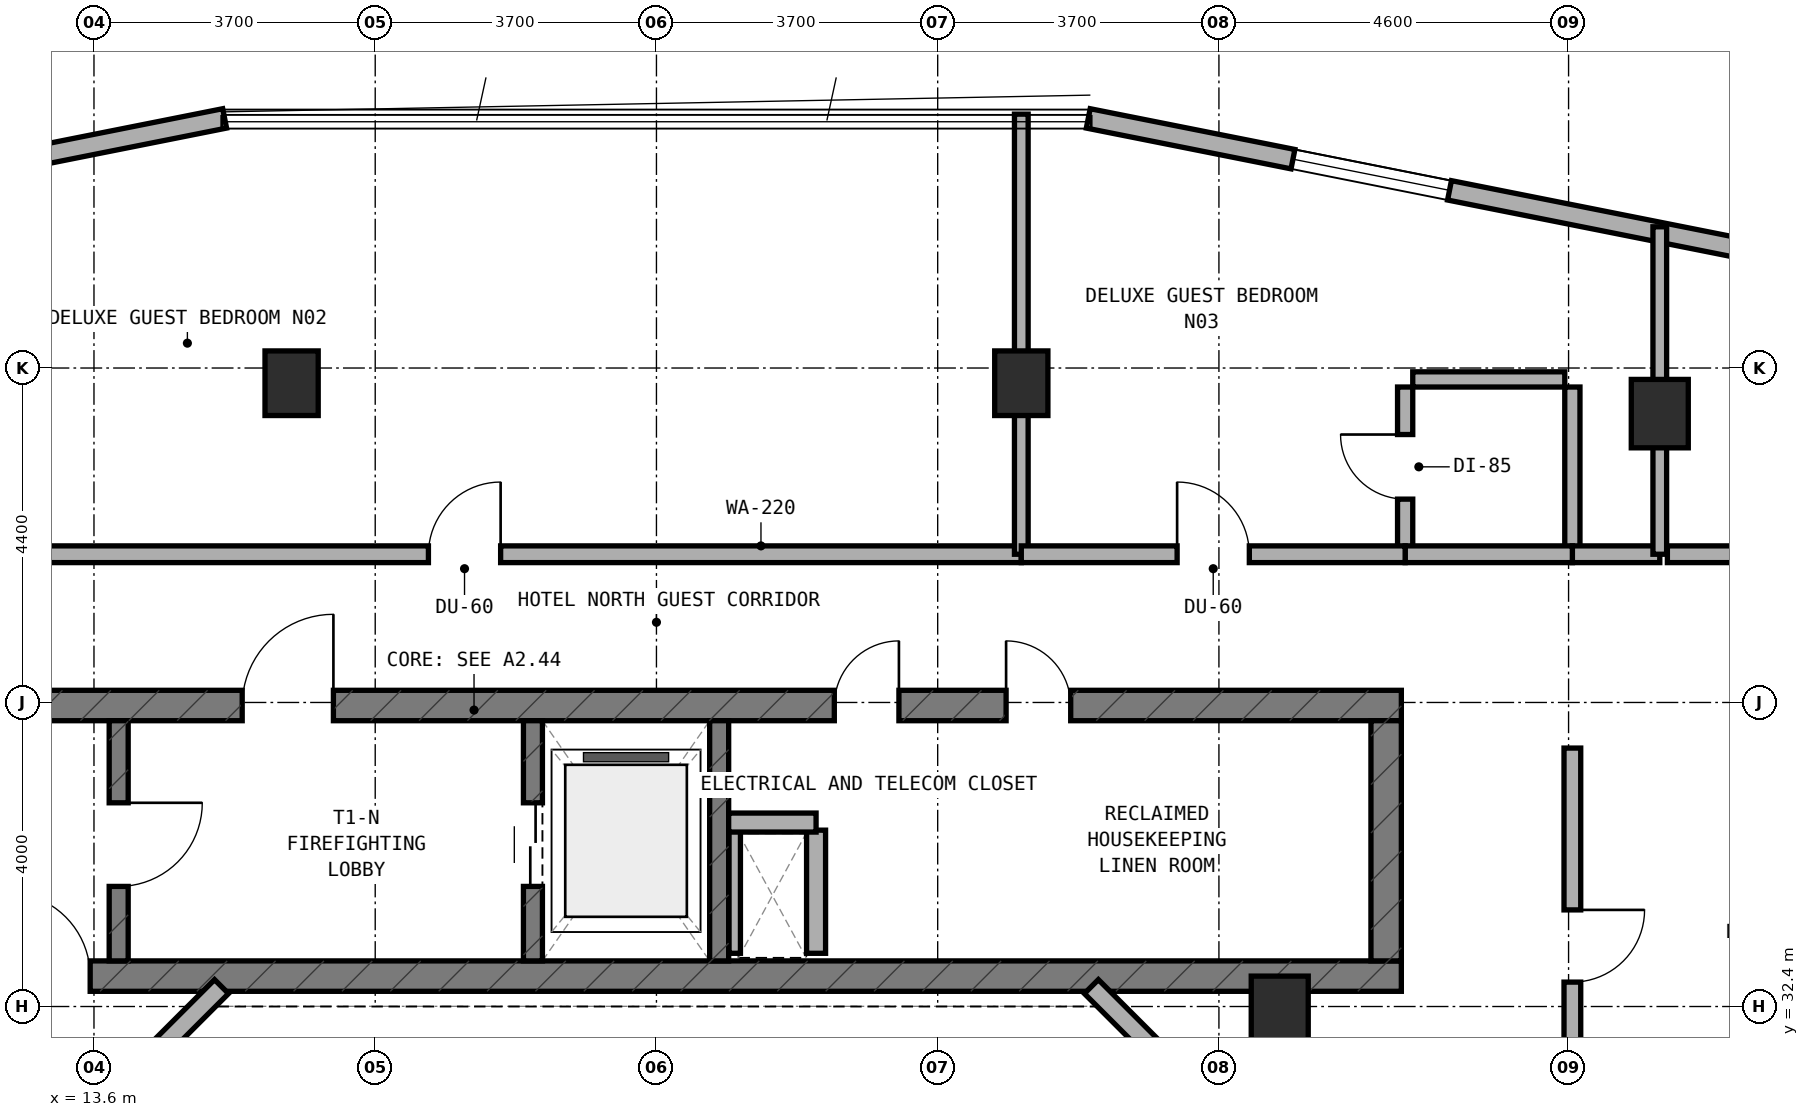
"""IFC4 building model, lengths in metres.
Left out: names, types, materials, properties, quantities, classifications, styles, units other than length and angle.
Written with IfcOpenShell. Run it as: python <this file> out.ifc"""

import sys

from ifc_helpers import new_model, si_unit, direction, frame, frame_2d, origin, origin_2d, place, context, subcontext, project, spatial, rectangle, extrude, element, fill, save


model = new_model("IFC4")
c1 = context("Model", 3, precision=1e-05, world=origin(), true_north=direction((0.0, 1.0)))
c2 = subcontext(c1, "Body", "Model", "MODEL_VIEW")
j1 = project(units=[si_unit("LENGTHUNIT", "METRE"), si_unit("PLANEANGLEUNIT", "RADIAN")], contexts=[c1])
p1 = place(None, origin())
s1 = spatial("IfcSite", under=j1, at=p1, CompositionType="ELEMENT")
p2 = place(p1, origin())
s2 = spatial("IfcBuilding", under=s1, at=p2, CompositionType="ELEMENT")
p3 = place(p2, frame((0.0, 0.0, 202.7)))
s3 = spatial("IfcBuildingStorey", under=s2, at=p3, CompositionType="ELEMENT", Elevation=202.7)
p4 = place(p3, frame((6.4, 32.8, 0.0), z_axis=(0.0, 0.0, 1.0), x_axis=(1.0, 0.0, 0.0)))
e1 = element("IfcWall", 1, at=p4, inside=s3, PredefinedType="SHEAR", context=c2, shape_type="SweptSolid", body=[
    extrude(rectangle(XDim=24.4, YDim=0.4, at=frame_2d((12.2, 0.0))), origin(), (0.0, 0.0, 1.0), 3.6),
])
p5 = place(p4, frame((6.05, 0.0, 0.0)))
e2 = element("IfcOpeningElement", 2, at=p5, cuts=e1, PredefinedType="OPENING", context=c2, shape_type="SweptSolid", body=[
    extrude(rectangle(XDim=1.1, YDim=2.15, at=frame_2d((0.55, 1.075))), frame((0.0, 0.21, 0.0), z_axis=(0.0, -1.0, 0.0), x_axis=(1.0, 0.0, 0.0)), (0.0, 0.0, 1.0), 0.42),
])
p6 = place(p3, frame((6.4, 36.36, 0.0), z_axis=(0.0, 0.0, 1.0), x_axis=(1.0, 0.0, 0.0)))
e3 = element("IfcWall", 3, at=p6, inside=s3, PredefinedType="SHEAR", context=c2, shape_type="SweptSolid", body=[
    extrude(rectangle(XDim=24.4, YDim=0.4, at=frame_2d((12.2, 0.0))), origin(), (0.0, 0.0, 1.0), 3.6),
])
p7 = place(p6, frame((9.15, 0.0, 0.0)))
e4 = element("IfcOpeningElement", 4, at=p7, cuts=e3, PredefinedType="OPENING", context=c2, shape_type="SweptSolid", body=[
    extrude(rectangle(XDim=1.2, YDim=2.15, at=frame_2d((0.6, 1.075))), frame((0.0, 0.21, 0.0), z_axis=(0.0, -1.0, 0.0), x_axis=(1.0, 0.0, 0.0)), (0.0, 0.0, 1.0), 0.42),
])
p8 = place(p6, frame((19.2, 0.0, 0.0)))
e5 = element("IfcOpeningElement", 5, at=p8, cuts=e3, PredefinedType="OPENING", context=c2, shape_type="SweptSolid", body=[
    extrude(rectangle(XDim=0.85, YDim=2.1, at=frame_2d((0.425, 1.05))), frame((0.0, 0.21, 0.0), z_axis=(0.0, -1.0, 0.0), x_axis=(1.0, 0.0, 0.0)), (0.0, 0.0, 1.0), 0.42),
])
p9 = place(p6, frame((16.94, 0.0, 0.0)))
e6 = element("IfcOpeningElement", 6, at=p9, cuts=e3, PredefinedType="OPENING", context=c2, shape_type="SweptSolid", body=[
    extrude(rectangle(XDim=0.85, YDim=2.1, at=frame_2d((0.425, 1.05))), frame((0.0, 0.21, 0.0), z_axis=(0.0, -1.0, 0.0), x_axis=(1.0, 0.0, 0.0)), (0.0, 0.0, 1.0), 0.42),
])
p10 = place(p3, frame((30.6, 33.0, 0.0), z_axis=(0.0, 0.0, 1.0), x_axis=(0.0, 1.0, 0.0)))
e7 = element("IfcWall", 7, at=p10, inside=s3, PredefinedType="SHEAR", context=c2, shape_type="SweptSolid", body=[
    extrude(rectangle(XDim=3.16, YDim=0.4, at=frame_2d((1.58, 0.0))), origin(), (0.0, 0.0, 1.0), 3.6),
])
p11 = place(p3, frame((13.925, 33.0, 0.0), z_axis=(0.0, 0.0, 1.0), x_axis=(0.0, 1.0, 0.0)))
e8 = element("IfcWall", 8, at=p11, inside=s3, PredefinedType="STANDARD", context=c2, shape_type="SweptSolid", body=[
    extrude(rectangle(XDim=3.16, YDim=0.25, at=frame_2d((1.58, 0.0))), origin(), (0.0, 0.0, 1.0), 3.32),
])
p12 = place(p11, frame((0.98, 0.0, 0.0)))
e9 = element("IfcOpeningElement", 9, at=p12, cuts=e8, PredefinedType="OPENING", context=c2, shape_type="SweptSolid", body=[
    extrude(rectangle(XDim=1.1, YDim=2.15, at=frame_2d((0.55, 1.075))), frame((0.0, 0.135, 0.0), z_axis=(0.0, -1.0, 0.0), x_axis=(1.0, 0.0, 0.0)), (0.0, 0.0, 1.0), 0.27),
])
p13 = place(p3, frame((19.375, 33.0, 0.0), z_axis=(0.0, 0.0, 1.0), x_axis=(0.0, 1.0, 0.0)))
e10 = element("IfcWall", 10, at=p13, inside=s3, PredefinedType="STANDARD", context=c2, shape_type="SweptSolid", body=[
    extrude(rectangle(XDim=3.16, YDim=0.25, at=frame_2d((1.58, 0.0))), origin(), (0.0, 0.0, 1.0), 3.32),
])
p14 = place(p13, frame((0.98, 0.0, 0.0)))
e11 = element("IfcOpeningElement", 11, at=p14, cuts=e10, PredefinedType="OPENING", context=c2, shape_type="SweptSolid", body=[
    extrude(rectangle(XDim=1.1, YDim=2.15, at=frame_2d((0.55, 1.075))), frame((0.0, 0.135, 0.0), z_axis=(0.0, -1.0, 0.0), x_axis=(1.0, 0.0, 0.0)), (0.0, 0.0, 1.0), 0.27),
])
p15 = place(p3, frame((21.825, 33.0, 0.0), z_axis=(0.0, 0.0, 1.0), x_axis=(0.0, 1.0, 0.0)))
e12 = element("IfcWall", 12, at=p15, inside=s3, PredefinedType="STANDARD", context=c2, shape_type="SweptSolid", body=[
    extrude(rectangle(XDim=3.16, YDim=0.25, at=frame_2d((1.58, 0.0))), origin(), (0.0, 0.0, 1.0), 3.32),
])
for number, where, z_axis, x_axis in (
    (13, (16.2, 40.6, 0.0), (0.0, 0.0, 1.0), (1.0, 0.0, 0.0)),
    (14, (25.8, 40.6, 0.0), (0.0, 0.0, 1.0), (1.0, 0.0, 0.0)),
):
    element("IfcColumn", number, at=place(p3, frame(where, z_axis=z_axis, x_axis=x_axis)), inside=s3, PredefinedType="COLUMN", context=c2, shape_type="SweptSolid", body=[
        extrude(rectangle(XDim=0.7, YDim=0.85, at=origin_2d()), origin(), (0.0, 0.0, 1.0), 3.6),
    ])
for number, where, z_axis, x_axis in (
    (15, (34.2, 40.2, 0.0), (0.0, 0.0, 1.0), (1.0, 0.0, 0.0)),
    (16, (29.2, 32.35, 0.0), (0.0, 0.0, 1.0), (1.0, 0.0, 0.0)),
):
    element("IfcColumn", number, at=place(p3, frame(where, z_axis=z_axis, x_axis=x_axis)), inside=s3, PredefinedType="COLUMN", context=c2, shape_type="SweptSolid", body=[
        extrude(rectangle(XDim=0.75, YDim=0.9, at=origin_2d()), origin(), (0.0, 0.0, 1.0), 3.6),
    ])
p16 = place(p3, frame((35.283, 42.371, 0.0), z_axis=(0.0, 0.0, 1.0), x_axis=(-0.980745199176, 0.195291715883, 0.0)))
e17 = element("IfcWall", 17, at=p16, inside=s3, PredefinedType="STANDARD", context=c2, shape_type="SweptSolid", body=[
    extrude(rectangle(XDim=8.771, YDim=0.26, at=frame_2d((4.385, 0.0))), origin(), (0.0, 0.0, 1.0), 3.32),
])
p17 = place(p16, frame((3.925, 0.0, 0.85)))
e18 = element("IfcOpeningElement", 18, at=p17, cuts=e17, PredefinedType="OPENING", context=c2, shape_type="SweptSolid", body=[
    extrude(rectangle(XDim=2.1, YDim=1.5, at=frame_2d((1.05, 0.75))), frame((0.0, 0.14, 0.0), z_axis=(0.0, -1.0, 0.0), x_axis=(1.0, 0.0, 0.0)), (0.0, 0.0, 1.0), 0.28),
])
p18 = place(p3, frame((15.319, 44.084, 0.0), z_axis=(0.0, 0.0, 1.0), x_axis=(-0.980745199176, -0.195291715883, 0.0)))
e19 = element("IfcWall", 19, at=p18, inside=s3, PredefinedType="STANDARD", context=c2, shape_type="SweptSolid", body=[
    extrude(rectangle(XDim=8.771, YDim=0.26, at=frame_2d((4.385, 0.0))), origin(), (0.0, 0.0, 1.0), 3.32),
])
p19 = place(p18, frame((2.746, 0.0, 0.85)))
e20 = element("IfcOpeningElement", 20, at=p19, cuts=e19, PredefinedType="OPENING", context=c2, shape_type="SweptSolid", body=[
    extrude(rectangle(XDim=2.1, YDim=1.5, at=frame_2d((1.05, 0.75))), frame((0.0, 0.14, 0.0), z_axis=(0.0, -1.0, 0.0), x_axis=(1.0, 0.0, 0.0)), (0.0, 0.0, 1.0), 0.28),
])
for number, where, z_axis, x_axis in (
    (21, (28.556, 30.828, 0.0), (0.0, 0.0, 1.0), (-0.707, 0.707, 0.0)),
    (22, (15.278, 32.662, 0.0), (0.0, 0.0, 1.0), (-0.707, -0.707, 0.0)),
):
    element("IfcWall", number, at=place(p3, frame(where, z_axis=z_axis, x_axis=x_axis)), inside=s3, PredefinedType="STANDARD", context=c2, shape_type="SweptSolid", body=[
        extrude(rectangle(XDim=2.594, YDim=0.26, at=frame_2d((1.297, 0.0))), origin(), (0.0, 0.0, 1.0), 3.32),
    ])
p20 = place(p3, frame((22.03, 33.1, 0.0), z_axis=(0.0, 0.0, 1.0), x_axis=(0.0, 1.0, 0.0)))
e23 = element("IfcWall", 23, at=p20, inside=s3, PredefinedType="PARTITIONING", context=c2, shape_type="SweptSolid", body=[
    extrude(rectangle(XDim=1.62, YDim=0.15, at=frame_2d((0.81, 0.0))), origin(), (0.0, 0.0, 1.0), 3.32),
])
p21 = place(p3, frame((23.1, 33.1, 0.0), z_axis=(0.0, 0.0, 1.0), x_axis=(0.0, 1.0, 0.0)))
e24 = element("IfcWall", 24, at=p21, inside=s3, PredefinedType="SOLIDWALL", context=c2, shape_type="SweptSolid", body=[
    extrude(rectangle(XDim=1.62, YDim=0.25, at=frame_2d((0.81, 0.0))), origin(), (0.0, 0.0, 1.0), 3.32),
])
p22 = place(p3, frame((21.95, 34.82, 0.0), z_axis=(0.0, 0.0, 1.0), x_axis=(1.0, 0.0, 0.0)))
e25 = element("IfcWall", 25, at=p22, inside=s3, PredefinedType="SOLIDWALL", context=c2, shape_type="SweptSolid", body=[
    extrude(rectangle(XDim=1.15, YDim=0.25, at=frame_2d((0.575, 0.0))), origin(), (0.0, 0.0, 1.0), 3.32),
])
p23 = place(p3, frame((11.15, 38.35, 0.0), z_axis=(0.0, 0.0, 1.0), x_axis=(1.0, 0.0, 0.0)))
e26 = element("IfcWall", 26, at=p23, inside=s3, PredefinedType="SOLIDWALL", context=c2, shape_type="SweptSolid", body=[
    extrude(rectangle(XDim=14.65, YDim=0.22, at=frame_2d((7.325, 0.0))), origin(), (0.0, 0.0, 1.0), 2.695),
])
p24 = place(p23, frame((6.85, 0.0, 0.0)))
e27 = element("IfcOpeningElement", 27, at=p24, cuts=e26, PredefinedType="OPENING", context=c2, shape_type="SweptSolid", body=[
    extrude(rectangle(XDim=0.95, YDim=2.1, at=frame_2d((0.475, 1.05))), frame((0.0, 0.12, 0.0), z_axis=(0.0, -1.0, 0.0), x_axis=(1.0, 0.0, 0.0)), (0.0, 0.0, 1.0), 0.24),
])
p25 = place(p3, frame((25.8, 38.35, 0.0), z_axis=(0.0, 0.0, 1.0), x_axis=(0.0, 1.0, 0.0)))
e28 = element("IfcWall", 28, at=p25, inside=s3, PredefinedType="SOLIDWALL", context=c2, shape_type="SweptSolid", body=[
    extrude(rectangle(XDim=5.79, YDim=0.18, at=frame_2d((2.895, 0.0))), origin(), (0.0, 0.0, 1.0), 2.695),
])
p26 = place(p3, frame((30.85, 38.45, 0.0), z_axis=(0.0, 0.0, 1.0), x_axis=(0.0, 1.0, 0.0)))
e29 = element("IfcWall", 29, at=p26, inside=s3, PredefinedType="PLUMBINGWALL", context=c2, shape_type="SweptSolid", body=[
    extrude(rectangle(XDim=2.1, YDim=0.2, at=frame_2d((1.05, 0.0))), origin(), (0.0, 0.0, 1.0), 2.845),
])
p27 = place(p26, frame((0.625, 0.0, 0.0)))
e30 = element("IfcOpeningElement", 30, at=p27, cuts=e29, PredefinedType="OPENING", context=c2, shape_type="SweptSolid", body=[
    extrude(rectangle(XDim=0.85, YDim=2.1, at=frame_2d((0.425, 1.05))), frame((0.0, 0.11, 0.0), z_axis=(0.0, -1.0, 0.0), x_axis=(1.0, 0.0, 0.0)), (0.0, 0.0, 1.0), 0.22),
])
p28 = place(p3, frame((30.95, 40.65, 0.0), z_axis=(0.0, 0.0, 1.0), x_axis=(1.0, 0.0, 0.0)))
e31 = element("IfcWall", 31, at=p28, inside=s3, PredefinedType="PLUMBINGWALL", context=c2, shape_type="SweptSolid", body=[
    extrude(rectangle(XDim=2.0, YDim=0.2, at=frame_2d((1.0, 0.0))), origin(), (0.0, 0.0, 1.0), 3.32),
])
p29 = place(p3, frame((33.05, 38.45, 0.0), z_axis=(0.0, 0.0, 1.0), x_axis=(0.0, 1.0, 0.0)))
e32 = element("IfcWall", 32, at=p29, inside=s3, PredefinedType="PLUMBINGWALL", context=c2, shape_type="SweptSolid", body=[
    extrude(rectangle(XDim=2.1, YDim=0.2, at=frame_2d((1.05, 0.0))), origin(), (0.0, 0.0, 1.0), 2.845),
])
p30 = place(p3, frame((33.05, 38.35, 0.0), z_axis=(0.0, 0.0, 1.0), x_axis=(1.0, 0.0, 0.0)))
e33 = element("IfcWall", 33, at=p30, inside=s3, PredefinedType="SOLIDWALL", context=c2, shape_type="SweptSolid", body=[
    extrude(rectangle(XDim=1.15, YDim=0.22, at=frame_2d((0.575, 0.0))), origin(), (0.0, 0.0, 1.0), 2.695),
])
p31 = place(p3, frame((30.85, 38.35, 0.0), z_axis=(0.0, 0.0, 1.0), x_axis=(1.0, 0.0, 0.0)))
e34 = element("IfcWall", 34, at=p31, inside=s3, PredefinedType="SOLIDWALL", context=c2, shape_type="SweptSolid", body=[
    extrude(rectangle(XDim=2.2, YDim=0.22, at=frame_2d((1.1, 0.0))), origin(), (0.0, 0.0, 1.0), 3.32),
])
p32 = place(p3, frame((25.8, 38.35, 0.0), z_axis=(0.0, 0.0, 1.0), x_axis=(1.0, 0.0, 0.0)))
e35 = element("IfcWall", 35, at=p32, inside=s3, PredefinedType="SOLIDWALL", context=c2, shape_type="SweptSolid", body=[
    extrude(rectangle(XDim=5.05, YDim=0.22, at=frame_2d((2.525, 0.0))), origin(), (0.0, 0.0, 1.0), 2.695),
])
p33 = place(p32, frame((2.05, 0.0, 0.0)))
e36 = element("IfcOpeningElement", 36, at=p33, cuts=e35, PredefinedType="OPENING", context=c2, shape_type="SweptSolid", body=[
    extrude(rectangle(XDim=0.95, YDim=2.1, at=frame_2d((0.475, 1.05))), frame((0.0, 0.12, 0.0), z_axis=(0.0, -1.0, 0.0), x_axis=(1.0, 0.0, 0.0)), (0.0, 0.0, 1.0), 0.24),
])
p34 = place(p3, frame((34.2, 38.35, 0.0), z_axis=(0.0, 0.0, 1.0), x_axis=(0.0, 1.0, 0.0)))
e37 = element("IfcWall", 37, at=p34, inside=s3, PredefinedType="SOLIDWALL", context=c2, shape_type="SweptSolid", body=[
    extrude(rectangle(XDim=4.308, YDim=0.18, at=frame_2d((2.154, 0.0))), origin(), (0.0, 0.0, 1.0), 2.695),
])
p35 = place(p3, frame((34.3, 38.35, 0.0), z_axis=(0.0, 0.0, 1.0), x_axis=(1.0, 0.0, 0.0)))
e38 = element("IfcWall", 38, at=p35, inside=s3, PredefinedType="SOLIDWALL", context=c2, shape_type="SweptSolid", body=[
    extrude(rectangle(XDim=5.64, YDim=0.22, at=frame_2d((2.82, 0.0))), origin(), (0.0, 0.0, 1.0), 3.015),
])
p36 = place(p35, frame((2.1, 0.0, 0.0)))
e39 = element("IfcOpeningElement", 39, at=p36, cuts=e38, PredefinedType="OPENING", context=c2, shape_type="SweptSolid", body=[
    extrude(rectangle(XDim=0.95, YDim=2.1, at=frame_2d((0.475, 1.05))), frame((0.0, 0.12, 0.0), z_axis=(0.0, -1.0, 0.0), x_axis=(1.0, 0.0, 0.0)), (0.0, 0.0, 1.0), 0.24),
])
p37 = place(p3, frame((33.05, 30.593, 0.0), z_axis=(0.0, 0.0, 1.0), x_axis=(0.0, 1.0, 0.0)))
e40 = element("IfcWall", 40, at=p37, inside=s3, PredefinedType="SOLIDWALL", context=c2, shape_type="SweptSolid", body=[
    extrude(rectangle(XDim=5.207, YDim=0.22, at=frame_2d((2.604, 0.0))), origin(), (0.0, 0.0, 1.0), 2.695),
])
p38 = place(p37, frame((2.128, 0.0, 0.0)))
e41 = element("IfcOpeningElement", 41, at=p38, cuts=e40, PredefinedType="OPENING", context=c2, shape_type="SweptSolid", body=[
    extrude(rectangle(XDim=0.95, YDim=2.1, at=frame_2d((0.475, 1.05))), frame((0.0, 0.12, 0.0), z_axis=(0.0, -1.0, 0.0), x_axis=(1.0, 0.0, 0.0)), (0.0, 0.0, 1.0), 0.24),
])
p39 = place(p17, origin())
e42 = element("IfcWindow", 42, at=p39, inside=s3, PartitioningType="SINGLE_PANEL", PredefinedType="WINDOW", context=c2, shape_type="SweptSolid", body=[
    extrude(rectangle(XDim=2.1, YDim=1.5, at=frame_2d((1.05, 0.75))), frame((0.0, 0.03, 0.0), z_axis=(0.0, -1.0, 0.0), x_axis=(1.0, 0.0, 0.0)), (0.0, 0.0, 1.0), 0.06),
])
fill(e18, e42)
p40 = place(p12, frame((1.1, 0.0, 0.0), z_axis=(0.0, 0.0, 1.0), x_axis=(-1.0, 0.0, 0.0)))
e43 = element("IfcDoor", 43, at=p40, inside=s3, OperationType="SINGLE_SWING_LEFT", PredefinedType="DOOR", context=c2, shape_type="SweptSolid", body=[
    extrude(rectangle(XDim=1.1, YDim=2.15, at=frame_2d((0.55, 1.075))), frame((0.0, 0.025, 0.0), z_axis=(0.0, -1.0, 0.0), x_axis=(1.0, 0.0, 0.0)), (0.0, 0.0, 1.0), 0.05),
])
fill(e9, e43)
p41 = place(p7, origin())
e44 = element("IfcDoor", 44, at=p41, inside=s3, OperationType="SINGLE_SWING_RIGHT", PredefinedType="DOOR", context=c2, shape_type="SweptSolid", body=[
    extrude(rectangle(XDim=1.2, YDim=2.15, at=frame_2d((0.6, 1.075))), frame((0.0, 0.025, 0.0), z_axis=(0.0, -1.0, 0.0), x_axis=(1.0, 0.0, 0.0)), (0.0, 0.0, 1.0), 0.05),
])
fill(e4, e44)
p42 = place(p14, origin())
e45 = element("IfcDoor", 45, at=p42, inside=s3, OperationType="DOUBLE_DOOR_SLIDING", PredefinedType="DOOR", context=c2, shape_type="SweptSolid", body=[
    extrude(rectangle(XDim=1.1, YDim=2.15, at=frame_2d((0.55, 1.075))), frame((0.0, 0.025, 0.0), z_axis=(0.0, -1.0, 0.0), x_axis=(1.0, 0.0, 0.0)), (0.0, 0.0, 1.0), 0.05),
])
fill(e11, e45)
p43 = place(p8, origin())
e46 = element("IfcDoor", 46, at=p43, inside=s3, OperationType="SINGLE_SWING_LEFT", PredefinedType="DOOR", context=c2, shape_type="SweptSolid", body=[
    extrude(rectangle(XDim=0.85, YDim=2.1, at=frame_2d((0.425, 1.05))), frame((0.0, 0.025, 0.0), z_axis=(0.0, -1.0, 0.0), x_axis=(1.0, 0.0, 0.0)), (0.0, 0.0, 1.0), 0.05),
])
fill(e5, e46)
p44 = place(p9, origin())
e47 = element("IfcDoor", 47, at=p44, inside=s3, OperationType="SINGLE_SWING_RIGHT", PredefinedType="DOOR", context=c2, shape_type="SweptSolid", body=[
    extrude(rectangle(XDim=0.85, YDim=2.1, at=frame_2d((0.425, 1.05))), frame((0.0, 0.025, 0.0), z_axis=(0.0, -1.0, 0.0), x_axis=(1.0, 0.0, 0.0)), (0.0, 0.0, 1.0), 0.05),
])
fill(e6, e47)
p45 = place(p5, origin())
e48 = element("IfcDoor", 48, at=p45, inside=s3, OperationType="SINGLE_SWING_LEFT", PredefinedType="DOOR", context=c2, shape_type="SweptSolid", body=[
    extrude(rectangle(XDim=1.1, YDim=2.15, at=frame_2d((0.55, 1.075))), frame((0.0, 0.025, 0.0), z_axis=(0.0, -1.0, 0.0), x_axis=(1.0, 0.0, 0.0)), (0.0, 0.0, 1.0), 0.05),
])
fill(e2, e48)
p46 = place(p24, origin())
e49 = element("IfcDoor", 49, at=p46, inside=s3, OperationType="SINGLE_SWING_RIGHT", PredefinedType="DOOR", context=c2, shape_type="SweptSolid", body=[
    extrude(rectangle(XDim=0.95, YDim=2.1, at=frame_2d((0.475, 1.05))), frame((0.0, 0.025, 0.0), z_axis=(0.0, -1.0, 0.0), x_axis=(1.0, 0.0, 0.0)), (0.0, 0.0, 1.0), 0.05),
])
fill(e27, e49)
p47 = place(p27, origin())
e50 = element("IfcDoor", 50, at=p47, inside=s3, OperationType="SINGLE_SWING_RIGHT", PredefinedType="DOOR", context=c2, shape_type="SweptSolid", body=[
    extrude(rectangle(XDim=0.85, YDim=2.1, at=frame_2d((0.425, 1.05))), frame((0.0, 0.025, 0.0), z_axis=(0.0, -1.0, 0.0), x_axis=(1.0, 0.0, 0.0)), (0.0, 0.0, 1.0), 0.05),
])
fill(e30, e50)
p48 = place(p33, origin())
e51 = element("IfcDoor", 51, at=p48, inside=s3, OperationType="SINGLE_SWING_LEFT", PredefinedType="DOOR", context=c2, shape_type="SweptSolid", body=[
    extrude(rectangle(XDim=0.95, YDim=2.1, at=frame_2d((0.475, 1.05))), frame((0.0, 0.025, 0.0), z_axis=(0.0, -1.0, 0.0), x_axis=(1.0, 0.0, 0.0)), (0.0, 0.0, 1.0), 0.05),
])
fill(e36, e51)
p49 = place(p38, frame((0.95, 0.0, 0.0), z_axis=(0.0, 0.0, 1.0), x_axis=(-1.0, 0.0, 0.0)))
e52 = element("IfcDoor", 52, at=p49, inside=s3, OperationType="SINGLE_SWING_LEFT", PredefinedType="DOOR", context=c2, shape_type="SweptSolid", body=[
    extrude(rectangle(XDim=0.95, YDim=2.1, at=frame_2d((0.475, 1.05))), frame((0.0, 0.025, 0.0), z_axis=(0.0, -1.0, 0.0), x_axis=(1.0, 0.0, 0.0)), (0.0, 0.0, 1.0), 0.05),
])
fill(e41, e52)
save(model, sys.argv[1])
